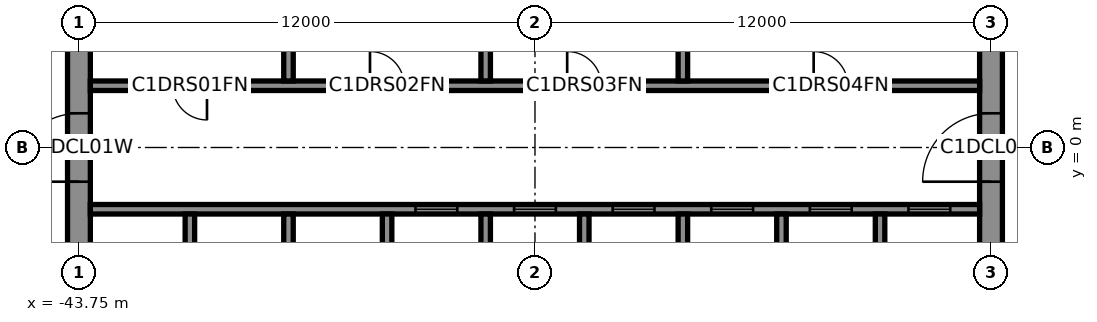
"""IFC4 building model, lengths in metres.
Left out: names, types, materials, properties, quantities, classifications, styles, units other than length and angle.
Written with IfcOpenShell. Run it as: python <this file> out.ifc"""

import sys

from ifc_helpers import new_model, si_unit, direction, frame, frame_2d, origin, place, context, subcontext, project, spatial, rectangle, extrude, element, fill, save


model = new_model("IFC4")
c1 = context("Model", 3, precision=1e-05, world=origin(), true_north=direction((0.0, 1.0)))
c2 = subcontext(c1, "Body", "Model", "MODEL_VIEW")
j1 = project(units=[si_unit("LENGTHUNIT", "METRE"), si_unit("PLANEANGLEUNIT", "RADIAN")], contexts=[c1])
p1 = place(None, origin())
s1 = spatial("IfcSite", under=j1, at=p1, CompositionType="ELEMENT")
p2 = place(p1, origin())
s2 = spatial("IfcBuilding", under=s1, at=p2, CompositionType="ELEMENT")
p3 = place(p2, frame((0.0, 0.0, 204.5)))
s3 = spatial("IfcBuildingStorey", under=s2, at=p3, CompositionType="ELEMENT", Elevation=204.5)
p4 = place(p3, frame((-19.75, -8.0, 0.0), z_axis=(0.0, 0.0, 1.0), x_axis=(0.0, 1.0, 0.0)))
e1 = element("IfcWall", 1, at=p4, inside=s3, PredefinedType="SHEAR", context=c2, shape_type="SweptSolid", body=[
    extrude(rectangle(XDim=16.0, YDim=0.6, at=frame_2d((8.0, 0.0))), origin(), (0.0, 0.0, 1.0), 6.0),
])
p5 = place(p4, frame((7.1, 0.0, 0.0)))
e2 = element("IfcOpeningElement", 2, at=p5, cuts=e1, PredefinedType="OPENING", context=c2, shape_type="SweptSolid", body=[
    extrude(rectangle(XDim=1.8, YDim=2.1, at=frame_2d((0.9, 1.05))), frame((0.0, 0.31, 0.0), z_axis=(0.0, -1.0, 0.0), x_axis=(1.0, 0.0, 0.0)), (0.0, 0.0, 1.0), 0.62),
])
p6 = place(p3, frame((-43.75, -8.0, 0.0), z_axis=(0.0, 0.0, 1.0), x_axis=(0.0, 1.0, 0.0)))
e3 = element("IfcWall", 3, at=p6, inside=s3, PredefinedType="SHEAR", context=c2, shape_type="SweptSolid", body=[
    extrude(rectangle(XDim=16.0, YDim=0.6, at=frame_2d((8.0, 0.0))), origin(), (0.0, 0.0, 1.0), 6.0),
])
p7 = place(p6, frame((7.1, 0.0, 0.0)))
e4 = element("IfcOpeningElement", 4, at=p7, cuts=e3, PredefinedType="OPENING", context=c2, shape_type="SweptSolid", body=[
    extrude(rectangle(XDim=1.8, YDim=2.1, at=frame_2d((0.9, 1.05))), frame((0.0, 0.31, 0.0), z_axis=(0.0, -1.0, 0.0), x_axis=(1.0, 0.0, 0.0)), (0.0, 0.0, 1.0), 0.62),
])
p8 = place(p3, frame((-43.45, 1.625, 0.0), z_axis=(0.0, 0.0, 1.0), x_axis=(1.0, 0.0, 0.0)))
e5 = element("IfcWall", 5, at=p8, inside=s3, PredefinedType="SHEAR", context=c2, shape_type="SweptSolid", body=[
    extrude(rectangle(XDim=23.4, YDim=0.25, at=frame_2d((11.7, 0.0))), origin(), (0.0, 0.0, 1.0), 6.0),
])
p9 = place(p8, frame((2.169, 0.0, 0.0)))
e6 = element("IfcOpeningElement", 6, at=p9, cuts=e5, PredefinedType="OPENING", context=c2, shape_type="SweptSolid", body=[
    extrude(rectangle(XDim=0.9, YDim=2.1, at=frame_2d((0.45, 1.05))), frame((0.0, 0.135, 0.0), z_axis=(0.0, -1.0, 0.0), x_axis=(1.0, 0.0, 0.0)), (0.0, 0.0, 1.0), 0.27),
])
p10 = place(p8, frame((7.358, 0.0, 0.0)))
e7 = element("IfcOpeningElement", 7, at=p10, cuts=e5, PredefinedType="OPENING", context=c2, shape_type="SweptSolid", body=[
    extrude(rectangle(XDim=0.9, YDim=2.1, at=frame_2d((0.45, 1.05))), frame((0.0, 0.135, 0.0), z_axis=(0.0, -1.0, 0.0), x_axis=(1.0, 0.0, 0.0)), (0.0, 0.0, 1.0), 0.27),
])
p11 = place(p8, frame((12.547, 0.0, 0.0)))
e8 = element("IfcOpeningElement", 8, at=p11, cuts=e5, PredefinedType="OPENING", context=c2, shape_type="SweptSolid", body=[
    extrude(rectangle(XDim=0.9, YDim=2.1, at=frame_2d((0.45, 1.05))), frame((0.0, 0.135, 0.0), z_axis=(0.0, -1.0, 0.0), x_axis=(1.0, 0.0, 0.0)), (0.0, 0.0, 1.0), 0.27),
])
p12 = place(p8, frame((19.033, 0.0, 0.0)))
e9 = element("IfcOpeningElement", 9, at=p12, cuts=e5, PredefinedType="OPENING", context=c2, shape_type="SweptSolid", body=[
    extrude(rectangle(XDim=0.9, YDim=2.1, at=frame_2d((0.45, 1.05))), frame((0.0, 0.135, 0.0), z_axis=(0.0, -1.0, 0.0), x_axis=(1.0, 0.0, 0.0)), (0.0, 0.0, 1.0), 0.27),
])
p13 = place(p3, frame((-43.45, -1.625, 0.0), z_axis=(0.0, 0.0, 1.0), x_axis=(1.0, 0.0, 0.0)))
e10 = element("IfcWall", 10, at=p13, inside=s3, PredefinedType="SHEAR", context=c2, shape_type="SweptSolid", body=[
    extrude(rectangle(XDim=23.4, YDim=0.25, at=frame_2d((11.7, 0.0))), origin(), (0.0, 0.0, 1.0), 6.0),
])
p14 = place(p13, frame((8.556, 0.0, 0.0)))
e11 = element("IfcOpeningElement", 11, at=p14, cuts=e10, PredefinedType="OPENING", context=c2, shape_type="SweptSolid", body=[
    extrude(rectangle(XDim=1.1, YDim=2.1, at=frame_2d((0.55, 1.05))), frame((0.0, 0.135, 0.0), z_axis=(0.0, -1.0, 0.0), x_axis=(1.0, 0.0, 0.0)), (0.0, 0.0, 1.0), 0.27),
])
p15 = place(p13, frame((11.15, 0.0, 0.0)))
e12 = element("IfcOpeningElement", 12, at=p15, cuts=e10, PredefinedType="OPENING", context=c2, shape_type="SweptSolid", body=[
    extrude(rectangle(XDim=1.1, YDim=2.1, at=frame_2d((0.55, 1.05))), frame((0.0, 0.135, 0.0), z_axis=(0.0, -1.0, 0.0), x_axis=(1.0, 0.0, 0.0)), (0.0, 0.0, 1.0), 0.27),
])
p16 = place(p13, frame((13.744, 0.0, 0.0)))
e13 = element("IfcOpeningElement", 13, at=p16, cuts=e10, PredefinedType="OPENING", context=c2, shape_type="SweptSolid", body=[
    extrude(rectangle(XDim=1.1, YDim=2.1, at=frame_2d((0.55, 1.05))), frame((0.0, 0.135, 0.0), z_axis=(0.0, -1.0, 0.0), x_axis=(1.0, 0.0, 0.0)), (0.0, 0.0, 1.0), 0.27),
])
p17 = place(p13, frame((16.339, 0.0, 0.0)))
e14 = element("IfcOpeningElement", 14, at=p17, cuts=e10, PredefinedType="OPENING", context=c2, shape_type="SweptSolid", body=[
    extrude(rectangle(XDim=1.1, YDim=2.1, at=frame_2d((0.55, 1.05))), frame((0.0, 0.135, 0.0), z_axis=(0.0, -1.0, 0.0), x_axis=(1.0, 0.0, 0.0)), (0.0, 0.0, 1.0), 0.27),
])
p18 = place(p13, frame((18.933, 0.0, 0.0)))
e15 = element("IfcOpeningElement", 15, at=p18, cuts=e10, PredefinedType="OPENING", context=c2, shape_type="SweptSolid", body=[
    extrude(rectangle(XDim=1.1, YDim=2.1, at=frame_2d((0.55, 1.05))), frame((0.0, 0.135, 0.0), z_axis=(0.0, -1.0, 0.0), x_axis=(1.0, 0.0, 0.0)), (0.0, 0.0, 1.0), 0.27),
])
p19 = place(p13, frame((21.528, 0.0, 0.0)))
e16 = element("IfcOpeningElement", 16, at=p19, cuts=e10, PredefinedType="OPENING", context=c2, shape_type="SweptSolid", body=[
    extrude(rectangle(XDim=1.1, YDim=2.1, at=frame_2d((0.55, 1.05))), frame((0.0, 0.135, 0.0), z_axis=(0.0, -1.0, 0.0), x_axis=(1.0, 0.0, 0.0)), (0.0, 0.0, 1.0), 0.27),
])
for number, where, z_axis, x_axis in (
    (17, (-38.236, 1.75, 0.0), (0.0, 0.0, 1.0), (0.0, 1.0, 0.0)),
    (18, (-33.047, 1.75, 0.0), (0.0, 0.0, 1.0), (0.0, 1.0, 0.0)),
    (19, (-27.858, 1.75, 0.0), (0.0, 0.0, 1.0), (0.0, 1.0, 0.0)),
    (20, (-40.831, -4.15, 0.0), (0.0, 0.0, 1.0), (0.0, 1.0, 0.0)),
    (21, (-38.236, -4.15, 0.0), (0.0, 0.0, 1.0), (0.0, 1.0, 0.0)),
    (22, (-35.642, -4.15, 0.0), (0.0, 0.0, 1.0), (0.0, 1.0, 0.0)),
    (23, (-33.047, -4.15, 0.0), (0.0, 0.0, 1.0), (0.0, 1.0, 0.0)),
    (24, (-30.453, -4.15, 0.0), (0.0, 0.0, 1.0), (0.0, 1.0, 0.0)),
    (25, (-27.858, -4.15, 0.0), (0.0, 0.0, 1.0), (0.0, 1.0, 0.0)),
    (26, (-25.264, -4.15, 0.0), (0.0, 0.0, 1.0), (0.0, 1.0, 0.0)),
    (27, (-22.669, -4.15, 0.0), (0.0, 0.0, 1.0), (0.0, 1.0, 0.0)),
):
    element("IfcWall", number, at=place(p3, frame(where, z_axis=z_axis, x_axis=x_axis)), inside=s3, PredefinedType="SHEAR", context=c2, shape_type="SweptSolid", body=[
        extrude(rectangle(XDim=2.4, YDim=0.25, at=frame_2d((1.2, 0.0))), origin(), (0.0, 0.0, 1.0), 6.0),
    ])
p20 = place(p5, origin())
e28 = element("IfcDoor", 28, at=p20, inside=s3, OperationType="DOUBLE_DOOR_SINGLE_SWING", PredefinedType="DOOR", context=c2, shape_type="SweptSolid", body=[
    extrude(rectangle(XDim=1.8, YDim=2.1, at=frame_2d((0.9, 1.05))), frame((0.0, 0.3, 0.0), z_axis=(0.0, -1.0, 0.0), x_axis=(1.0, 0.0, 0.0)), (0.0, 0.0, 1.0), 0.05),
])
fill(e2, e28)
p21 = place(p7, origin())
e29 = element("IfcDoor", 29, at=p21, inside=s3, OperationType="DOUBLE_DOOR_SINGLE_SWING", PredefinedType="DOOR", context=c2, shape_type="SweptSolid", body=[
    extrude(rectangle(XDim=1.8, YDim=2.1, at=frame_2d((0.9, 1.05))), frame((0.0, -0.25, 0.0), z_axis=(0.0, -1.0, 0.0), x_axis=(1.0, 0.0, 0.0)), (0.0, 0.0, 1.0), 0.05),
])
fill(e4, e29)
p22 = place(p9, origin())
e30 = element("IfcDoor", 30, at=p22, inside=s3, OperationType="SINGLE_SWING_RIGHT", PredefinedType="DOOR", context=c2, shape_type="SweptSolid", body=[
    extrude(rectangle(XDim=0.9, YDim=2.1, at=frame_2d((0.45, 1.05))), frame((0.0, 0.025, 0.0), z_axis=(0.0, -1.0, 0.0), x_axis=(1.0, 0.0, 0.0)), (0.0, 0.0, 1.0), 0.05),
])
fill(e6, e30)
p23 = place(p10, origin())
e31 = element("IfcDoor", 31, at=p23, inside=s3, OperationType="SINGLE_SWING_LEFT", PredefinedType="DOOR", context=c2, shape_type="SweptSolid", body=[
    extrude(rectangle(XDim=0.9, YDim=2.1, at=frame_2d((0.45, 1.05))), frame((0.0, 0.025, 0.0), z_axis=(0.0, -1.0, 0.0), x_axis=(1.0, 0.0, 0.0)), (0.0, 0.0, 1.0), 0.05),
])
fill(e7, e31)
p24 = place(p11, origin())
e32 = element("IfcDoor", 32, at=p24, inside=s3, OperationType="SINGLE_SWING_LEFT", PredefinedType="DOOR", context=c2, shape_type="SweptSolid", body=[
    extrude(rectangle(XDim=0.9, YDim=2.1, at=frame_2d((0.45, 1.05))), frame((0.0, 0.025, 0.0), z_axis=(0.0, -1.0, 0.0), x_axis=(1.0, 0.0, 0.0)), (0.0, 0.0, 1.0), 0.05),
])
fill(e8, e32)
p25 = place(p12, origin())
e33 = element("IfcDoor", 33, at=p25, inside=s3, OperationType="SINGLE_SWING_LEFT", PredefinedType="DOOR", context=c2, shape_type="SweptSolid", body=[
    extrude(rectangle(XDim=0.9, YDim=2.1, at=frame_2d((0.45, 1.05))), frame((0.0, 0.025, 0.0), z_axis=(0.0, -1.0, 0.0), x_axis=(1.0, 0.0, 0.0)), (0.0, 0.0, 1.0), 0.05),
])
fill(e9, e33)
p26 = place(p14, origin())
e34 = element("IfcDoor", 34, at=p26, inside=s3, OperationType="DOUBLE_DOOR_SLIDING", PredefinedType="DOOR", context=c2, shape_type="SweptSolid", body=[
    extrude(rectangle(XDim=1.1, YDim=2.1, at=frame_2d((0.55, 1.05))), frame((0.0, 0.025, 0.0), z_axis=(0.0, -1.0, 0.0), x_axis=(1.0, 0.0, 0.0)), (0.0, 0.0, 1.0), 0.05),
])
fill(e11, e34)
p27 = place(p15, origin())
e35 = element("IfcDoor", 35, at=p27, inside=s3, OperationType="DOUBLE_DOOR_SLIDING", PredefinedType="DOOR", context=c2, shape_type="SweptSolid", body=[
    extrude(rectangle(XDim=1.1, YDim=2.1, at=frame_2d((0.55, 1.05))), frame((0.0, 0.025, 0.0), z_axis=(0.0, -1.0, 0.0), x_axis=(1.0, 0.0, 0.0)), (0.0, 0.0, 1.0), 0.05),
])
fill(e12, e35)
p28 = place(p16, origin())
e36 = element("IfcDoor", 36, at=p28, inside=s3, OperationType="DOUBLE_DOOR_SLIDING", PredefinedType="DOOR", context=c2, shape_type="SweptSolid", body=[
    extrude(rectangle(XDim=1.1, YDim=2.1, at=frame_2d((0.55, 1.05))), frame((0.0, 0.025, 0.0), z_axis=(0.0, -1.0, 0.0), x_axis=(1.0, 0.0, 0.0)), (0.0, 0.0, 1.0), 0.05),
])
fill(e13, e36)
p29 = place(p17, origin())
e37 = element("IfcDoor", 37, at=p29, inside=s3, OperationType="DOUBLE_DOOR_SLIDING", PredefinedType="DOOR", context=c2, shape_type="SweptSolid", body=[
    extrude(rectangle(XDim=1.1, YDim=2.1, at=frame_2d((0.55, 1.05))), frame((0.0, 0.025, 0.0), z_axis=(0.0, -1.0, 0.0), x_axis=(1.0, 0.0, 0.0)), (0.0, 0.0, 1.0), 0.05),
])
fill(e14, e37)
p30 = place(p18, origin())
e38 = element("IfcDoor", 38, at=p30, inside=s3, OperationType="DOUBLE_DOOR_SLIDING", PredefinedType="DOOR", context=c2, shape_type="SweptSolid", body=[
    extrude(rectangle(XDim=1.1, YDim=2.1, at=frame_2d((0.55, 1.05))), frame((0.0, 0.025, 0.0), z_axis=(0.0, -1.0, 0.0), x_axis=(1.0, 0.0, 0.0)), (0.0, 0.0, 1.0), 0.05),
])
fill(e15, e38)
p31 = place(p19, origin())
e39 = element("IfcDoor", 39, at=p31, inside=s3, OperationType="DOUBLE_DOOR_SLIDING", PredefinedType="DOOR", context=c2, shape_type="SweptSolid", body=[
    extrude(rectangle(XDim=1.1, YDim=2.1, at=frame_2d((0.55, 1.05))), frame((0.0, 0.025, 0.0), z_axis=(0.0, -1.0, 0.0), x_axis=(1.0, 0.0, 0.0)), (0.0, 0.0, 1.0), 0.05),
])
fill(e16, e39)
save(model, sys.argv[1])
